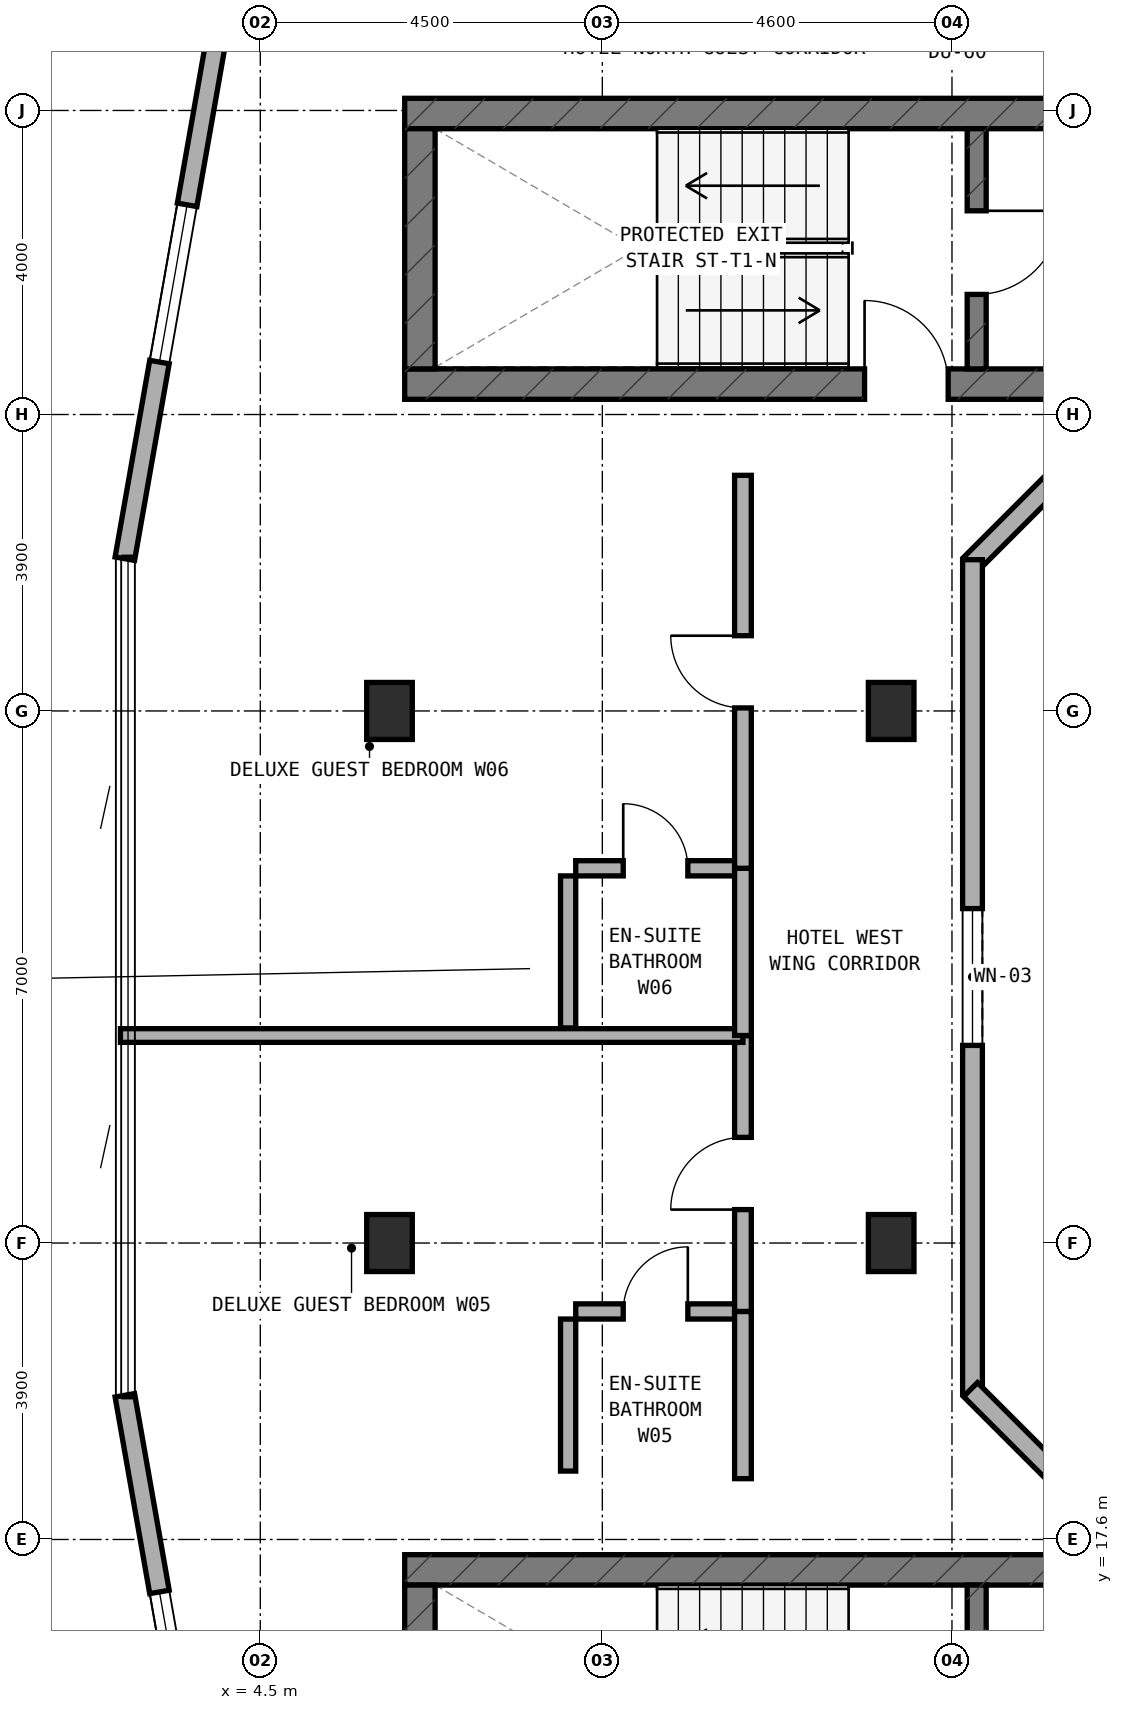
"""IFC4 building model, lengths in metres.
Left out: names, types, materials, properties, quantities, classifications, styles, units other than length and angle.
Written with IfcOpenShell. Run it as: python <this file> out.ifc"""

import sys

from ifc_helpers import new_model, si_unit, direction, frame, frame_2d, origin, origin_2d, place, context, subcontext, project, spatial, rectangle, extrude, element, fill, save


model = new_model("IFC4")
c1 = context("Model", 3, precision=1e-05, world=origin(), true_north=direction((0.0, 1.0)))
c2 = subcontext(c1, "Body", "Model", "MODEL_VIEW")
j1 = project(units=[si_unit("LENGTHUNIT", "METRE"), si_unit("PLANEANGLEUNIT", "RADIAN")], contexts=[c1])
p1 = place(None, origin())
s1 = spatial("IfcSite", under=j1, at=p1, CompositionType="ELEMENT")
p2 = place(p1, origin())
s2 = spatial("IfcBuilding", under=s1, at=p2, CompositionType="ELEMENT")
p3 = place(p2, frame((0.0, 0.0, 243.2)))
s3 = spatial("IfcBuildingStorey", under=s2, at=p3, CompositionType="ELEMENT", Elevation=243.2)
p4 = place(p3, frame((6.4, 32.8, 0.0), z_axis=(0.0, 0.0, 1.0), x_axis=(1.0, 0.0, 0.0)))
e1 = element("IfcWall", 1, at=p4, inside=s3, PredefinedType="SHEAR", context=c2, shape_type="SweptSolid", body=[
    extrude(rectangle(XDim=24.4, YDim=0.4, at=frame_2d((12.2, 0.0))), origin(), (0.0, 0.0, 1.0), 3.6),
])
p5 = place(p4, frame((6.05, 0.0, 0.0)))
e2 = element("IfcOpeningElement", 2, at=p5, cuts=e1, PredefinedType="OPENING", context=c2, shape_type="SweptSolid", body=[
    extrude(rectangle(XDim=1.1, YDim=2.15, at=frame_2d((0.55, 1.075))), frame((0.0, 0.21, 0.0), z_axis=(0.0, -1.0, 0.0), x_axis=(1.0, 0.0, 0.0)), (0.0, 0.0, 1.0), 0.42),
])
p6 = place(p3, frame((6.4, 36.36, 0.0), z_axis=(0.0, 0.0, 1.0), x_axis=(1.0, 0.0, 0.0)))
e3 = element("IfcWall", 3, at=p6, inside=s3, PredefinedType="SHEAR", context=c2, shape_type="SweptSolid", body=[
    extrude(rectangle(XDim=24.4, YDim=0.4, at=frame_2d((12.2, 0.0))), origin(), (0.0, 0.0, 1.0), 3.6),
])
p7 = place(p6, frame((9.15, 0.0, 0.0)))
e4 = element("IfcOpeningElement", 4, at=p7, cuts=e3, PredefinedType="OPENING", context=c2, shape_type="SweptSolid", body=[
    extrude(rectangle(XDim=1.2, YDim=2.15, at=frame_2d((0.6, 1.075))), frame((0.0, 0.21, 0.0), z_axis=(0.0, -1.0, 0.0), x_axis=(1.0, 0.0, 0.0)), (0.0, 0.0, 1.0), 0.42),
])
p8 = place(p6, frame((19.2, 0.0, 0.0)))
e5 = element("IfcOpeningElement", 5, at=p8, cuts=e3, PredefinedType="OPENING", context=c2, shape_type="SweptSolid", body=[
    extrude(rectangle(XDim=0.85, YDim=2.1, at=frame_2d((0.425, 1.05))), frame((0.0, 0.21, 0.0), z_axis=(0.0, -1.0, 0.0), x_axis=(1.0, 0.0, 0.0)), (0.0, 0.0, 1.0), 0.42),
])
p9 = place(p6, frame((16.94, 0.0, 0.0)))
e6 = element("IfcOpeningElement", 6, at=p9, cuts=e3, PredefinedType="OPENING", context=c2, shape_type="SweptSolid", body=[
    extrude(rectangle(XDim=0.85, YDim=2.1, at=frame_2d((0.425, 1.05))), frame((0.0, 0.21, 0.0), z_axis=(0.0, -1.0, 0.0), x_axis=(1.0, 0.0, 0.0)), (0.0, 0.0, 1.0), 0.42),
])
p10 = place(p3, frame((6.6, 33.0, 0.0), z_axis=(0.0, 0.0, 1.0), x_axis=(0.0, 1.0, 0.0)))
e7 = element("IfcWall", 7, at=p10, inside=s3, PredefinedType="SHEAR", context=c2, shape_type="SweptSolid", body=[
    extrude(rectangle(XDim=3.16, YDim=0.4, at=frame_2d((1.58, 0.0))), origin(), (0.0, 0.0, 1.0), 3.6),
])
p11 = place(p3, frame((13.925, 33.0, 0.0), z_axis=(0.0, 0.0, 1.0), x_axis=(0.0, 1.0, 0.0)))
e8 = element("IfcWall", 8, at=p11, inside=s3, PredefinedType="STANDARD", context=c2, shape_type="SweptSolid", body=[
    extrude(rectangle(XDim=3.16, YDim=0.25, at=frame_2d((1.58, 0.0))), origin(), (0.0, 0.0, 1.0), 3.32),
])
p12 = place(p11, frame((0.98, 0.0, 0.0)))
e9 = element("IfcOpeningElement", 9, at=p12, cuts=e8, PredefinedType="OPENING", context=c2, shape_type="SweptSolid", body=[
    extrude(rectangle(XDim=1.1, YDim=2.15, at=frame_2d((0.55, 1.075))), frame((0.0, 0.135, 0.0), z_axis=(0.0, -1.0, 0.0), x_axis=(1.0, 0.0, 0.0)), (0.0, 0.0, 1.0), 0.27),
])
p13 = place(p3, frame((6.4, 17.2, 0.0), z_axis=(0.0, 0.0, 1.0), x_axis=(1.0, 0.0, 0.0)))
e10 = element("IfcWall", 10, at=p13, inside=s3, PredefinedType="SHEAR", context=c2, shape_type="SweptSolid", body=[
    extrude(rectangle(XDim=24.4, YDim=0.4, at=frame_2d((12.2, 0.0))), origin(), (0.0, 0.0, 1.0), 3.6),
])
p14 = place(p3, frame((6.6, 13.84, 0.0), z_axis=(0.0, 0.0, 1.0), x_axis=(0.0, 1.0, 0.0)))
e11 = element("IfcWall", 11, at=p14, inside=s3, PredefinedType="SHEAR", context=c2, shape_type="SweptSolid", body=[
    extrude(rectangle(XDim=3.16, YDim=0.4, at=frame_2d((1.58, 0.0))), origin(), (0.0, 0.0, 1.0), 3.6),
])
p15 = place(p3, frame((13.925, 13.84, 0.0), z_axis=(0.0, 0.0, 1.0), x_axis=(0.0, 1.0, 0.0)))
e12 = element("IfcWall", 12, at=p15, inside=s3, PredefinedType="STANDARD", context=c2, shape_type="SweptSolid", body=[
    extrude(rectangle(XDim=3.16, YDim=0.25, at=frame_2d((1.58, 0.0))), origin(), (0.0, 0.0, 1.0), 3.32),
])
p16 = place(p15, frame((0.98, 0.0, 0.0)))
e13 = element("IfcOpeningElement", 13, at=p16, cuts=e12, PredefinedType="OPENING", context=c2, shape_type="SweptSolid", body=[
    extrude(rectangle(XDim=1.1, YDim=2.15, at=frame_2d((0.55, 1.075))), frame((0.0, 0.135, 0.0), z_axis=(0.0, -1.0, 0.0), x_axis=(1.0, 0.0, 0.0)), (0.0, 0.0, 1.0), 0.27),
])
for number, where, z_axis, x_axis in (
    (14, (6.2, 21.5, 0.0), (0.0, 0.0, 1.0), (1.0, 0.0, 0.0)),
    (15, (6.2, 28.5, 0.0), (0.0, 0.0, 1.0), (1.0, 0.0, 0.0)),
    (16, (12.8, 21.5, 0.0), (0.0, 0.0, 1.0), (1.0, 0.0, 0.0)),
    (17, (12.8, 28.5, 0.0), (0.0, 0.0, 1.0), (1.0, 0.0, 0.0)),
):
    element("IfcColumn", number, at=place(p3, frame(where, z_axis=z_axis, x_axis=x_axis)), inside=s3, PredefinedType="COLUMN", context=c2, shape_type="SweptSolid", body=[
        extrude(rectangle(XDim=0.6, YDim=0.75, at=origin_2d()), origin(), (0.0, 0.0, 1.0), 3.6),
    ])
p17 = place(p3, frame((4.229, 39.085, 0.0), z_axis=(0.0, 0.0, 1.0), x_axis=(-0.173396937698, -0.984852020355, 0.0)))
e18 = element("IfcWall", 18, at=p17, inside=s3, PredefinedType="STANDARD", context=c2, shape_type="SweptSolid", body=[
    extrude(rectangle(XDim=8.714, YDim=0.26, at=frame_2d((4.357, 0.0))), origin(), (0.0, 0.0, 1.0), 3.32),
])
p18 = place(p17, frame((3.987, 0.0, 0.85)))
e19 = element("IfcOpeningElement", 19, at=p18, cuts=e18, PredefinedType="OPENING", context=c2, shape_type="SweptSolid", body=[
    extrude(rectangle(XDim=2.1, YDim=1.5, at=frame_2d((1.05, 0.75))), frame((0.0, 0.14, 0.0), z_axis=(0.0, -1.0, 0.0), x_axis=(1.0, 0.0, 0.0)), (0.0, 0.0, 1.0), 0.28),
])
p19 = place(p3, frame((2.718, 19.497, 0.0), z_axis=(0.0, 0.0, 1.0), x_axis=(0.173396937698, -0.984852020355, 0.0)))
e20 = element("IfcWall", 20, at=p19, inside=s3, PredefinedType="STANDARD", context=c2, shape_type="SweptSolid", body=[
    extrude(rectangle(XDim=8.714, YDim=0.26, at=frame_2d((4.357, 0.0))), origin(), (0.0, 0.0, 1.0), 3.32),
])
p20 = place(p19, frame((2.627, 0.0, 0.85)))
e21 = element("IfcOpeningElement", 21, at=p20, cuts=e20, PredefinedType="OPENING", context=c2, shape_type="SweptSolid", body=[
    extrude(rectangle(XDim=2.1, YDim=1.5, at=frame_2d((1.05, 0.75))), frame((0.0, 0.14, 0.0), z_axis=(0.0, -1.0, 0.0), x_axis=(1.0, 0.0, 0.0)), (0.0, 0.0, 1.0), 0.28),
])
p21 = place(p3, frame((15.678, 32.262, 0.0), z_axis=(0.0, 0.0, 1.0), x_axis=(-0.707106781187, -0.707106781187, 0.0)))
e22 = element("IfcWall", 22, at=p21, inside=s3, PredefinedType="STANDARD", context=c2, shape_type="SweptSolid", body=[
    extrude(rectangle(XDim=2.594, YDim=0.26, at=frame_2d((1.297, 0.0))), origin(), (0.0, 0.0, 1.0), 3.32),
])
p22 = place(p3, frame((13.87, 30.49, 0.0), z_axis=(0.0, 0.0, 1.0), x_axis=(0.0, -1.0, 0.0)))
e23 = element("IfcWall", 23, at=p22, inside=s3, PredefinedType="STANDARD", context=c2, shape_type="SweptSolid", body=[
    extrude(rectangle(XDim=10.98, YDim=0.26, at=frame_2d((5.49, 0.0))), origin(), (0.0, 0.0, 1.0), 3.32),
])
p23 = place(p22, frame((4.59, 0.0, 0.85)))
e24 = element("IfcOpeningElement", 24, at=p23, cuts=e23, PredefinedType="OPENING", context=c2, shape_type="SweptSolid", body=[
    extrude(rectangle(XDim=1.8, YDim=1.5, at=frame_2d((0.9, 0.75))), frame((0.0, 0.14, 0.0), z_axis=(0.0, -1.0, 0.0), x_axis=(1.0, 0.0, 0.0)), (0.0, 0.0, 1.0), 0.28),
])
p24 = place(p3, frame((13.844, 19.572, 0.0), z_axis=(0.0, 0.0, 1.0), x_axis=(0.707106781187, -0.707106781187, 0.0)))
e25 = element("IfcWall", 25, at=p24, inside=s3, PredefinedType="STANDARD", context=c2, shape_type="SweptSolid", body=[
    extrude(rectangle(XDim=2.594, YDim=0.26, at=frame_2d((1.297, 0.0))), origin(), (0.0, 0.0, 1.0), 3.32),
])
p25 = place(p3, frame((8.65, 20.6, 0.0), z_axis=(0.0, 0.0, 1.0), x_axis=(1.0, 0.0, 0.0)))
e26 = element("IfcWall", 26, at=p25, inside=s3, PredefinedType="PLUMBINGWALL", context=c2, shape_type="SweptSolid", body=[
    extrude(rectangle(XDim=2.1, YDim=0.2, at=frame_2d((1.05, 0.0))), origin(), (0.0, 0.0, 1.0), 3.32),
])
p26 = place(p25, frame((0.625, 0.0, 0.0)))
e27 = element("IfcOpeningElement", 27, at=p26, cuts=e26, PredefinedType="OPENING", context=c2, shape_type="SweptSolid", body=[
    extrude(rectangle(XDim=0.85, YDim=2.1, at=frame_2d((0.425, 1.05))), frame((0.0, 0.11, 0.0), z_axis=(0.0, -1.0, 0.0), x_axis=(1.0, 0.0, 0.0)), (0.0, 0.0, 1.0), 0.22),
])
p27 = place(p3, frame((8.55, 18.5, 0.0), z_axis=(0.0, 0.0, 1.0), x_axis=(0.0, 1.0, 0.0)))
e28 = element("IfcWall", 28, at=p27, inside=s3, PredefinedType="PLUMBINGWALL", context=c2, shape_type="SweptSolid", body=[
    extrude(rectangle(XDim=2.0, YDim=0.2, at=frame_2d((1.0, 0.0))), origin(), (0.0, 0.0, 1.0), 3.32),
])
p28 = place(p3, frame((10.85, 18.4, 0.0), z_axis=(0.0, 0.0, 1.0), x_axis=(0.0, 1.0, 0.0)))
e29 = element("IfcWall", 29, at=p28, inside=s3, PredefinedType="SOLIDWALL", context=c2, shape_type="SweptSolid", body=[
    extrude(rectangle(XDim=2.2, YDim=0.22, at=frame_2d((1.1, 0.0))), origin(), (0.0, 0.0, 1.0), 3.32),
])
p29 = place(p3, frame((10.85, 20.6, 0.0), z_axis=(0.0, 0.0, 1.0), x_axis=(0.0, 1.0, 0.0)))
e30 = element("IfcWall", 30, at=p29, inside=s3, PredefinedType="SOLIDWALL", context=c2, shape_type="SweptSolid", body=[
    extrude(rectangle(XDim=3.63, YDim=0.22, at=frame_2d((1.815, 0.0))), origin(), (0.0, 0.0, 1.0), 2.745),
])
p30 = place(p29, frame((1.34, 0.0, 0.0)))
e31 = element("IfcOpeningElement", 31, at=p30, cuts=e30, PredefinedType="OPENING", context=c2, shape_type="SweptSolid", body=[
    extrude(rectangle(XDim=0.95, YDim=2.1, at=frame_2d((0.475, 1.05))), frame((0.0, 0.12, 0.0), z_axis=(0.0, -1.0, 0.0), x_axis=(1.0, 0.0, 0.0)), (0.0, 0.0, 1.0), 0.24),
])
p31 = place(p3, frame((2.66, 24.23, 0.0), z_axis=(0.0, 0.0, 1.0), x_axis=(1.0, 0.0, 0.0)))
e32 = element("IfcWall", 32, at=p31, inside=s3, PredefinedType="SOLIDWALL", context=c2, shape_type="SweptSolid", body=[
    extrude(rectangle(XDim=8.19, YDim=0.18, at=frame_2d((4.095, 0.0))), origin(), (0.0, 0.0, 1.0), 3.015),
])
p32 = place(p3, frame((8.65, 26.43, 0.0), z_axis=(0.0, 0.0, 1.0), x_axis=(1.0, 0.0, 0.0)))
e33 = element("IfcWall", 33, at=p32, inside=s3, PredefinedType="PLUMBINGWALL", context=c2, shape_type="SweptSolid", body=[
    extrude(rectangle(XDim=2.1, YDim=0.2, at=frame_2d((1.05, 0.0))), origin(), (0.0, 0.0, 1.0), 3.32),
])
p33 = place(p32, frame((0.625, 0.0, 0.0)))
e34 = element("IfcOpeningElement", 34, at=p33, cuts=e33, PredefinedType="OPENING", context=c2, shape_type="SweptSolid", body=[
    extrude(rectangle(XDim=0.85, YDim=2.1, at=frame_2d((0.425, 1.05))), frame((0.0, 0.11, 0.0), z_axis=(0.0, -1.0, 0.0), x_axis=(1.0, 0.0, 0.0)), (0.0, 0.0, 1.0), 0.22),
])
p34 = place(p3, frame((8.55, 24.33, 0.0), z_axis=(0.0, 0.0, 1.0), x_axis=(0.0, 1.0, 0.0)))
e35 = element("IfcWall", 35, at=p34, inside=s3, PredefinedType="PLUMBINGWALL", context=c2, shape_type="SweptSolid", body=[
    extrude(rectangle(XDim=2.0, YDim=0.2, at=frame_2d((1.0, 0.0))), origin(), (0.0, 0.0, 1.0), 3.32),
])
p35 = place(p3, frame((10.85, 24.23, 0.0), z_axis=(0.0, 0.0, 1.0), x_axis=(0.0, 1.0, 0.0)))
e36 = element("IfcWall", 36, at=p35, inside=s3, PredefinedType="SOLIDWALL", context=c2, shape_type="SweptSolid", body=[
    extrude(rectangle(XDim=2.2, YDim=0.22, at=frame_2d((1.1, 0.0))), origin(), (0.0, 0.0, 1.0), 3.32),
])
p36 = place(p3, frame((10.85, 26.43, 0.0), z_axis=(0.0, 0.0, 1.0), x_axis=(0.0, 1.0, 0.0)))
e37 = element("IfcWall", 37, at=p36, inside=s3, PredefinedType="SOLIDWALL", context=c2, shape_type="SweptSolid", body=[
    extrude(rectangle(XDim=5.17, YDim=0.22, at=frame_2d((2.585, 0.0))), origin(), (0.0, 0.0, 1.0), 2.745),
])
p37 = place(p36, frame((2.11, 0.0, 0.0)))
e38 = element("IfcOpeningElement", 38, at=p37, cuts=e37, PredefinedType="OPENING", context=c2, shape_type="SweptSolid", body=[
    extrude(rectangle(XDim=0.95, YDim=2.1, at=frame_2d((0.475, 1.05))), frame((0.0, 0.12, 0.0), z_axis=(0.0, -1.0, 0.0), x_axis=(1.0, 0.0, 0.0)), (0.0, 0.0, 1.0), 0.24),
])
p38 = place(p18, origin())
e39 = element("IfcWindow", 39, at=p38, inside=s3, PartitioningType="SINGLE_PANEL", PredefinedType="WINDOW", context=c2, shape_type="SweptSolid", body=[
    extrude(rectangle(XDim=2.1, YDim=1.5, at=frame_2d((1.05, 0.75))), frame((0.0, 0.03, 0.0), z_axis=(0.0, -1.0, 0.0), x_axis=(1.0, 0.0, 0.0)), (0.0, 0.0, 1.0), 0.06),
])
fill(e19, e39)
p39 = place(p20, origin())
e40 = element("IfcWindow", 40, at=p39, inside=s3, PartitioningType="SINGLE_PANEL", PredefinedType="WINDOW", context=c2, shape_type="SweptSolid", body=[
    extrude(rectangle(XDim=2.1, YDim=1.5, at=frame_2d((1.05, 0.75))), frame((0.0, 0.03, 0.0), z_axis=(0.0, -1.0, 0.0), x_axis=(1.0, 0.0, 0.0)), (0.0, 0.0, 1.0), 0.06),
])
fill(e21, e40)
p40 = place(p23, origin())
e41 = element("IfcWindow", 41, at=p40, inside=s3, PartitioningType="SINGLE_PANEL", PredefinedType="WINDOW", context=c2, shape_type="SweptSolid", body=[
    extrude(rectangle(XDim=1.8, YDim=1.5, at=frame_2d((0.9, 0.75))), frame((0.0, 0.03, 0.0), z_axis=(0.0, -1.0, 0.0), x_axis=(1.0, 0.0, 0.0)), (0.0, 0.0, 1.0), 0.06),
])
fill(e24, e41)
p41 = place(p12, frame((1.1, 0.0, 0.0), z_axis=(0.0, 0.0, 1.0), x_axis=(-1.0, 0.0, 0.0)))
e42 = element("IfcDoor", 42, at=p41, inside=s3, OperationType="SINGLE_SWING_LEFT", PredefinedType="DOOR", context=c2, shape_type="SweptSolid", body=[
    extrude(rectangle(XDim=1.1, YDim=2.15, at=frame_2d((0.55, 1.075))), frame((0.0, 0.025, 0.0), z_axis=(0.0, -1.0, 0.0), x_axis=(1.0, 0.0, 0.0)), (0.0, 0.0, 1.0), 0.05),
])
fill(e9, e42)
p42 = place(p5, origin())
e43 = element("IfcDoor", 43, at=p42, inside=s3, OperationType="SINGLE_SWING_LEFT", PredefinedType="DOOR", context=c2, shape_type="SweptSolid", body=[
    extrude(rectangle(XDim=1.1, YDim=2.15, at=frame_2d((0.55, 1.075))), frame((0.0, 0.025, 0.0), z_axis=(0.0, -1.0, 0.0), x_axis=(1.0, 0.0, 0.0)), (0.0, 0.0, 1.0), 0.05),
])
fill(e2, e43)
p43 = place(p26, origin())
e44 = element("IfcDoor", 44, at=p43, inside=s3, OperationType="SINGLE_SWING_RIGHT", PredefinedType="DOOR", context=c2, shape_type="SweptSolid", body=[
    extrude(rectangle(XDim=0.85, YDim=2.1, at=frame_2d((0.425, 1.05))), frame((0.0, 0.025, 0.0), z_axis=(0.0, -1.0, 0.0), x_axis=(1.0, 0.0, 0.0)), (0.0, 0.0, 1.0), 0.05),
])
fill(e27, e44)
p44 = place(p30, origin())
e45 = element("IfcDoor", 45, at=p44, inside=s3, OperationType="SINGLE_SWING_LEFT", PredefinedType="DOOR", context=c2, shape_type="SweptSolid", body=[
    extrude(rectangle(XDim=0.95, YDim=2.1, at=frame_2d((0.475, 1.05))), frame((0.0, 0.025, 0.0), z_axis=(0.0, -1.0, 0.0), x_axis=(1.0, 0.0, 0.0)), (0.0, 0.0, 1.0), 0.05),
])
fill(e31, e45)
p45 = place(p33, origin())
e46 = element("IfcDoor", 46, at=p45, inside=s3, OperationType="SINGLE_SWING_LEFT", PredefinedType="DOOR", context=c2, shape_type="SweptSolid", body=[
    extrude(rectangle(XDim=0.85, YDim=2.1, at=frame_2d((0.425, 1.05))), frame((0.0, 0.025, 0.0), z_axis=(0.0, -1.0, 0.0), x_axis=(1.0, 0.0, 0.0)), (0.0, 0.0, 1.0), 0.05),
])
fill(e34, e46)
p46 = place(p37, origin())
e47 = element("IfcDoor", 47, at=p46, inside=s3, OperationType="SINGLE_SWING_RIGHT", PredefinedType="DOOR", context=c2, shape_type="SweptSolid", body=[
    extrude(rectangle(XDim=0.95, YDim=2.1, at=frame_2d((0.475, 1.05))), frame((0.0, 0.025, 0.0), z_axis=(0.0, -1.0, 0.0), x_axis=(1.0, 0.0, 0.0)), (0.0, 0.0, 1.0), 0.05),
])
fill(e38, e47)
save(model, sys.argv[1])
